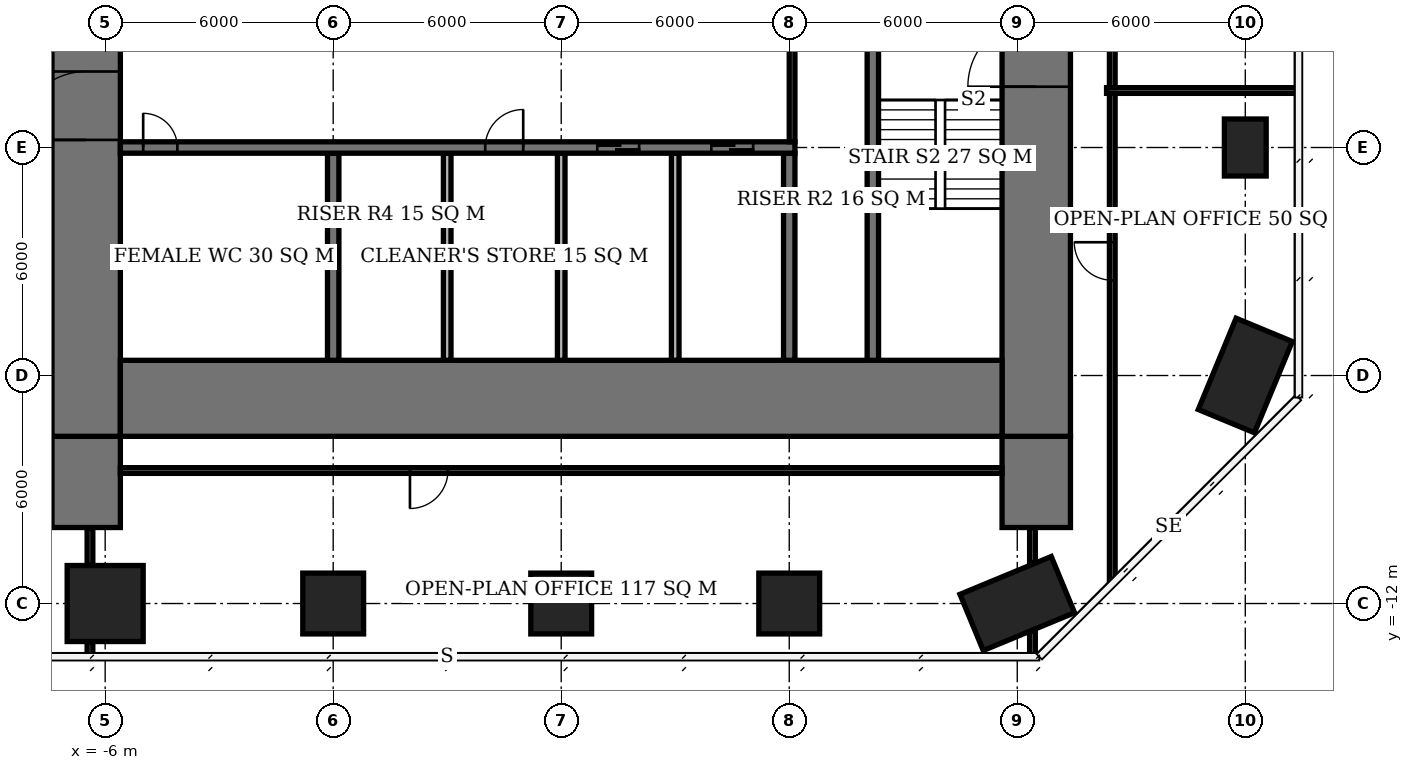
"""IFC4 building model, lengths in metres.
Left out: names, types, materials, properties, quantities, classifications, styles, units other than length and angle.
Written with IfcOpenShell. Run it as: python <this file> out.ifc"""

import sys

from ifc_helpers import new_model, si_unit, direction, frame, frame_2d, origin, origin_2d, place, context, subcontext, project, spatial, rectangle, extrude, element, fill, save


model = new_model("IFC4")
c1 = context("Model", 3, precision=1e-05, world=origin(), true_north=direction((0.0, 1.0)))
c2 = subcontext(c1, "Body", "Model", "MODEL_VIEW")
j1 = project(units=[si_unit("LENGTHUNIT", "METRE"), si_unit("PLANEANGLEUNIT", "RADIAN")], contexts=[c1])
p1 = place(None, origin())
s1 = spatial("IfcSite", under=j1, at=p1, CompositionType="ELEMENT")
p2 = place(p1, origin())
s2 = spatial("IfcBuilding", under=s1, at=p2, CompositionType="ELEMENT")
p3 = place(p2, frame((0.0, 0.0, 208.4)))
s3 = spatial("IfcBuildingStorey", under=s2, at=p3, CompositionType="ELEMENT", Elevation=208.4)
p4 = place(p3, frame((-6.0, -12.0, 0.0), z_axis=(0.0, 0.0, 1.0), x_axis=(1.0, 0.0, 0.0)))
e1 = element("IfcColumn", 1, at=p4, inside=s3, PredefinedType="COLUMN", context=c2, shape_type="SweptSolid", body=[
    extrude(rectangle(XDim=2.0, YDim=2.0, at=origin_2d()), origin(), (0.0, 0.0, 1.0), 3.9),
])
for number, where, z_axis, x_axis in (
    (2, (0.0, -12.0, 0.0), (0.0, 0.0, 1.0), (1.0, 0.0, 0.0)),
    (3, (6.0, -12.0, 0.0), (0.0, 0.0, 1.0), (1.0, 0.0, 0.0)),
    (4, (12.0, -12.0, 0.0), (0.0, 0.0, 1.0), (1.0, 0.0, 0.0)),
):
    element("IfcColumn", number, at=place(p3, frame(where, z_axis=z_axis, x_axis=x_axis)), inside=s3, PredefinedType="COLUMN", context=c2, shape_type="SweptSolid", body=[
        extrude(rectangle(XDim=1.6, YDim=1.6, at=origin_2d()), origin(), (0.0, 0.0, 1.0), 3.9),
    ])
for number, where, z_axis, x_axis in (
    (5, (18.0, -12.0, 0.0), (0.0, 0.0, 1.0), (-0.924, -0.383, 0.0)),
    (6, (24.0, -6.0, 0.0), (0.0, 0.0, 1.0), (-0.383, -0.924, 0.0)),
):
    element("IfcColumn", number, at=place(p3, frame(where, z_axis=z_axis, x_axis=x_axis)), inside=s3, PredefinedType="COLUMN", context=c2, shape_type="SweptSolid", body=[
        extrude(rectangle(XDim=2.6, YDim=1.6, at=origin_2d()), origin(), (0.0, 0.0, 1.0), 3.9),
    ])
p5 = place(p3, frame((24.0, 0.0, 0.0), z_axis=(0.0, 0.0, 1.0), x_axis=(0.0, 1.0, 0.0)))
e7 = element("IfcColumn", 7, at=p5, inside=s3, PredefinedType="COLUMN", context=c2, shape_type="SweptSolid", body=[
    extrude(rectangle(XDim=1.5, YDim=1.1, at=origin_2d()), origin(), (0.0, 0.0, 1.0), 3.9),
])
p6 = place(p3, frame((-5.6, -6.6, 0.0), z_axis=(0.0, 0.0, 1.0), x_axis=(1.0, 0.0, 0.0)))
e8 = element("IfcWall", 8, at=p6, inside=s3, PredefinedType="SHEAR", context=c2, shape_type="SweptSolid", body=[
    extrude(rectangle(XDim=23.2, YDim=2.0, at=frame_2d((11.6, 0.0))), origin(), (0.0, 0.0, 1.0), 3.9),
])
p7 = place(p3, frame((-6.5, -7.6, 0.0), z_axis=(0.0, 0.0, 1.0), x_axis=(0.0, 1.0, 0.0)))
e9 = element("IfcWall", 9, at=p7, inside=s3, PredefinedType="SHEAR", context=c2, shape_type="SweptSolid", body=[
    extrude(rectangle(XDim=21.2, YDim=1.8, at=frame_2d((10.6, 0.0))), origin(), (0.0, 0.0, 1.0), 3.9),
])
p8 = place(p7, frame((7.8, 0.0, 0.0)))
e10 = element("IfcOpeningElement", 10, at=p8, cuts=e9, PredefinedType="OPENING", context=c2, shape_type="SweptSolid", body=[
    extrude(rectangle(XDim=1.8, YDim=2.4, at=frame_2d((0.9, 1.2))), frame((0.0, 0.91, 0.0), z_axis=(0.0, -1.0, 0.0), x_axis=(1.0, 0.0, 0.0)), (0.0, 0.0, 1.0), 1.82),
])
p9 = place(p3, frame((18.5, -7.6, 0.0), z_axis=(0.0, 0.0, 1.0), x_axis=(0.0, 1.0, 0.0)))
e11 = element("IfcWall", 11, at=p9, inside=s3, PredefinedType="SHEAR", context=c2, shape_type="SweptSolid", body=[
    extrude(rectangle(XDim=21.2, YDim=1.8, at=frame_2d((10.6, 0.0))), origin(), (0.0, 0.0, 1.0), 3.9),
])
p10 = place(p9, frame((9.2, 0.0, 0.0)))
e12 = element("IfcOpeningElement", 12, at=p10, cuts=e11, PredefinedType="OPENING", context=c2, shape_type="SweptSolid", body=[
    extrude(rectangle(XDim=1.8, YDim=2.4, at=frame_2d((0.9, 1.2))), frame((0.0, 0.91, 0.0), z_axis=(0.0, -1.0, 0.0), x_axis=(1.0, 0.0, 0.0)), (0.0, 0.0, 1.0), 1.82),
])
for number, where, z_axis, x_axis in (
    (13, (-6.5, -10.0, 0.0), (0.0, 0.0, 1.0), (0.0, 1.0, 0.0)),
    (14, (18.5, -10.0, 0.0), (0.0, 0.0, 1.0), (0.0, 1.0, 0.0)),
):
    element("IfcWall", number, at=place(p3, frame(where, z_axis=z_axis, x_axis=x_axis)), inside=s3, PredefinedType="SHEAR", context=c2, shape_type="SweptSolid", body=[
        extrude(rectangle(XDim=2.4, YDim=1.8, at=frame_2d((1.2, 0.0))), origin(), (0.0, 0.0, 1.0), 3.9),
    ])
p11 = place(p3, frame((-5.6, 0.0, 0.0), z_axis=(0.0, 0.0, 1.0), x_axis=(1.0, 0.0, 0.0)))
e15 = element("IfcWall", 15, at=p11, inside=s3, PredefinedType="SHEAR", context=c2, shape_type="SweptSolid", body=[
    extrude(rectangle(XDim=17.75, YDim=0.3, at=frame_2d((8.875, 0.0))), origin(), (0.0, 0.0, 1.0), 3.9),
])
p12 = place(p11, frame((0.6, 0.0, 0.0)))
e16 = element("IfcOpeningElement", 16, at=p12, cuts=e15, PredefinedType="OPENING", context=c2, shape_type="SweptSolid", body=[
    extrude(rectangle(XDim=0.9, YDim=2.1, at=frame_2d((0.45, 1.05))), frame((0.0, 0.16, 0.0), z_axis=(0.0, -1.0, 0.0), x_axis=(1.0, 0.0, 0.0)), (0.0, 0.0, 1.0), 0.32),
])
p13 = place(p11, frame((9.6, 0.0, 0.0)))
e17 = element("IfcOpeningElement", 17, at=p13, cuts=e15, PredefinedType="OPENING", context=c2, shape_type="SweptSolid", body=[
    extrude(rectangle(XDim=1.0, YDim=2.1, at=frame_2d((0.5, 1.05))), frame((0.0, 0.16, 0.0), z_axis=(0.0, -1.0, 0.0), x_axis=(1.0, 0.0, 0.0)), (0.0, 0.0, 1.0), 0.32),
])
p14 = place(p11, frame((12.55, 0.0, 0.0)))
e18 = element("IfcOpeningElement", 18, at=p14, cuts=e15, PredefinedType="OPENING", context=c2, shape_type="SweptSolid", body=[
    extrude(rectangle(XDim=1.1, YDim=2.1, at=frame_2d((0.55, 1.05))), frame((0.0, 0.16, 0.0), z_axis=(0.0, -1.0, 0.0), x_axis=(1.0, 0.0, 0.0)), (0.0, 0.0, 1.0), 0.32),
])
p15 = place(p11, frame((15.55, 0.0, 0.0)))
e19 = element("IfcOpeningElement", 19, at=p15, cuts=e15, PredefinedType="OPENING", context=c2, shape_type="SweptSolid", body=[
    extrude(rectangle(XDim=1.1, YDim=2.1, at=frame_2d((0.55, 1.05))), frame((0.0, 0.16, 0.0), z_axis=(0.0, -1.0, 0.0), x_axis=(1.0, 0.0, 0.0)), (0.0, 0.0, 1.0), 0.32),
])
for number, where, z_axis, x_axis in (
    (20, (0.0, -5.6, 0.0), (0.0, 0.0, 1.0), (0.0, 1.0, 0.0)),
    (21, (12.0, -5.6, 0.0), (0.0, 0.0, 1.0), (0.0, 1.0, 0.0)),
):
    element("IfcWall", number, at=place(p3, frame(where, z_axis=z_axis, x_axis=x_axis)), inside=s3, PredefinedType="SHEAR", context=c2, shape_type="SweptSolid", body=[
        extrude(rectangle(XDim=5.45, YDim=0.3, at=frame_2d((2.725, 0.0))), origin(), (0.0, 0.0, 1.0), 3.9),
    ])
p16 = place(p3, frame((14.2, -5.6, 0.0), z_axis=(0.0, 0.0, 1.0), x_axis=(0.0, 1.0, 0.0)))
e22 = element("IfcWall", 22, at=p16, inside=s3, PredefinedType="SHEAR", context=c2, shape_type="SweptSolid", body=[
    extrude(rectangle(XDim=8.45, YDim=0.3, at=frame_2d((4.225, 0.0))), origin(), (0.0, 0.0, 1.0), 3.9),
])
for number, where, z_axis, x_axis in (
    (23, (3.0, -5.6, 0.0), (0.0, 0.0, 1.0), (0.0, 1.0, 0.0)),
    (24, (6.0, -5.6, 0.0), (0.0, 0.0, 1.0), (0.0, 1.0, 0.0)),
    (25, (9.0, -5.6, 0.0), (0.0, 0.0, 1.0), (0.0, 1.0, 0.0)),
):
    element("IfcWall", number, at=place(p3, frame(where, z_axis=z_axis, x_axis=x_axis)), inside=s3, PredefinedType="SOLIDWALL", context=c2, shape_type="SweptSolid", body=[
        extrude(rectangle(XDim=5.45, YDim=0.2, at=frame_2d((2.725, 0.0))), origin(), (0.0, 0.0, 1.0), 3.9),
    ])
p17 = place(p3, frame((-6.4, -13.35, 0.0), z_axis=(0.0, 0.0, 1.0), x_axis=(0.0, 1.0, 0.0)))
e26 = element("IfcWall", 26, at=p17, inside=s3, PredefinedType="PARTITIONING", context=c2, shape_type="SweptSolid", body=[
    extrude(rectangle(XDim=0.35, YDim=0.15, at=frame_2d((0.175, 0.0))), origin(), (0.0, 0.0, 1.0), 2.65),
])
p18 = place(p3, frame((-6.4, -11.0, 0.0), z_axis=(0.0, 0.0, 1.0), x_axis=(0.0, 1.0, 0.0)))
e27 = element("IfcWall", 27, at=p18, inside=s3, PredefinedType="PARTITIONING", context=c2, shape_type="SweptSolid", body=[
    extrude(rectangle(XDim=1.0, YDim=0.15, at=frame_2d((0.5, 0.0))), origin(), (0.0, 0.0, 1.0), 3.65),
])
p19 = place(p3, frame((17.6, -8.5, 0.0), z_axis=(0.0, 0.0, 1.0), x_axis=(-1.0, 0.0, 0.0)))
e28 = element("IfcWall", 28, at=p19, inside=s3, PredefinedType="PARTITIONING", context=c2, shape_type="SweptSolid", body=[
    extrude(rectangle(XDim=23.2, YDim=0.15, at=frame_2d((11.6, 0.0))), origin(), (0.0, 0.0, 1.0), 3.65),
])
p20 = place(p19, frame((14.58, 0.0, 0.0)))
e29 = element("IfcOpeningElement", 29, at=p20, cuts=e28, PredefinedType="OPENING", context=c2, shape_type="SweptSolid", body=[
    extrude(rectangle(XDim=1.0, YDim=2.1, at=frame_2d((0.5, 1.05))), frame((0.0, 0.085, 0.0), z_axis=(0.0, -1.0, 0.0), x_axis=(1.0, 0.0, 0.0)), (0.0, 0.0, 1.0), 0.17),
])
p21 = place(p3, frame((18.4, -13.4, 0.0), z_axis=(0.0, 0.0, 1.0), x_axis=(0.0, 1.0, 0.0)))
e30 = element("IfcWall", 30, at=p21, inside=s3, PredefinedType="PARTITIONING", context=c2, shape_type="SweptSolid", body=[
    extrude(rectangle(XDim=0.669, YDim=0.15, at=frame_2d((0.334, 0.0))), origin(), (0.0, 0.0, 1.0), 2.65),
])
p22 = place(p3, frame((18.4, -10.937, 0.0), z_axis=(0.0, 0.0, 1.0), x_axis=(0.0, 1.0, 0.0)))
e31 = element("IfcWall", 31, at=p22, inside=s3, PredefinedType="PARTITIONING", context=c2, shape_type="SweptSolid", body=[
    extrude(rectangle(XDim=0.937, YDim=0.15, at=frame_2d((0.469, 0.0))), origin(), (0.0, 0.0, 1.0), 3.65),
])
p23 = place(p3, frame((20.5, -11.39, 0.0), z_axis=(0.0, 0.0, 1.0), x_axis=(0.0, 1.0, 0.0)))
e32 = element("IfcWall", 32, at=p23, inside=s3, PredefinedType="PARTITIONING", context=c2, shape_type="SweptSolid", body=[
    extrude(rectangle(XDim=12.815, YDim=0.15, at=frame_2d((6.407, 0.0))), origin(), (0.0, 0.0, 1.0), 3.65),
])
p24 = place(p23, frame((7.897, 0.0, 0.0)))
e33 = element("IfcOpeningElement", 33, at=p24, cuts=e32, PredefinedType="OPENING", context=c2, shape_type="SweptSolid", body=[
    extrude(rectangle(XDim=1.0, YDim=2.1, at=frame_2d((0.5, 1.05))), frame((0.0, 0.085, 0.0), z_axis=(0.0, -1.0, 0.0), x_axis=(1.0, 0.0, 0.0)), (0.0, 0.0, 1.0), 0.17),
])
p25 = place(p3, frame((20.5, 1.575, 0.0), z_axis=(0.0, 0.0, 1.0), x_axis=(0.0, 1.0, 0.0)))
e34 = element("IfcWall", 34, at=p25, inside=s3, PredefinedType="PARTITIONING", context=c2, shape_type="SweptSolid", body=[
    extrude(rectangle(XDim=21.715, YDim=0.15, at=frame_2d((10.857, 0.0))), origin(), (0.0, 0.0, 1.0), 3.65),
])
p26 = place(p25, frame((17.52, 0.0, 0.0)))
e35 = element("IfcOpeningElement", 35, at=p26, cuts=e34, PredefinedType="OPENING", context=c2, shape_type="SweptSolid", body=[
    extrude(rectangle(XDim=1.0, YDim=2.1, at=frame_2d((0.5, 1.05))), frame((0.0, 0.085, 0.0), z_axis=(0.0, -1.0, 0.0), x_axis=(1.0, 0.0, 0.0)), (0.0, 0.0, 1.0), 0.17),
])
p27 = place(p3, frame((20.35, 1.5, 0.0), z_axis=(0.0, 0.0, 1.0), x_axis=(1.0, 0.0, 0.0)))
e36 = element("IfcWall", 36, at=p27, inside=s3, PredefinedType="PARTITIONING", context=c2, shape_type="SweptSolid", body=[
    extrude(rectangle(XDim=5.05, YDim=0.15, at=frame_2d((2.525, 0.0))), origin(), (0.0, 0.0, 1.0), 3.65),
])
p28 = place(p3, frame((12.075, 0.15, 0.0), z_axis=(0.0, 0.0, 1.0), x_axis=(0.0, 1.0, 0.0)))
e37 = element("IfcWall", 37, at=p28, inside=s3, PredefinedType="PARTITIONING", context=c2, shape_type="SweptSolid", body=[
    extrude(rectangle(XDim=3.0, YDim=0.15, at=frame_2d((1.5, 0.0))), origin(), (0.0, 0.0, 1.0), 3.65),
])
p29 = place(p8, origin())
e38 = element("IfcDoor", 38, at=p29, inside=s3, OperationType="DOUBLE_DOOR_SINGLE_SWING", PredefinedType="DOOR", context=c2, shape_type="SweptSolid", body=[
    extrude(rectangle(XDim=1.8, YDim=2.4, at=frame_2d((0.9, 1.2))), frame((0.0, 0.025, 0.0), z_axis=(0.0, -1.0, 0.0), x_axis=(1.0, 0.0, 0.0)), (0.0, 0.0, 1.0), 0.05),
])
fill(e10, e38)
p30 = place(p10, origin())
e39 = element("IfcDoor", 39, at=p30, inside=s3, OperationType="DOUBLE_DOOR_SINGLE_SWING", PredefinedType="DOOR", context=c2, shape_type="SweptSolid", body=[
    extrude(rectangle(XDim=1.8, YDim=2.4, at=frame_2d((0.9, 1.2))), frame((0.0, 0.025, 0.0), z_axis=(0.0, -1.0, 0.0), x_axis=(1.0, 0.0, 0.0)), (0.0, 0.0, 1.0), 0.05),
])
fill(e12, e39)
p31 = place(p12, origin())
e40 = element("IfcDoor", 40, at=p31, inside=s3, OperationType="SINGLE_SWING_LEFT", PredefinedType="DOOR", context=c2, shape_type="SweptSolid", body=[
    extrude(rectangle(XDim=0.9, YDim=2.1, at=frame_2d((0.45, 1.05))), frame((0.0, 0.025, 0.0), z_axis=(0.0, -1.0, 0.0), x_axis=(1.0, 0.0, 0.0)), (0.0, 0.0, 1.0), 0.05),
])
fill(e16, e40)
p32 = place(p13, origin())
e41 = element("IfcDoor", 41, at=p32, inside=s3, OperationType="SINGLE_SWING_RIGHT", PredefinedType="DOOR", context=c2, shape_type="SweptSolid", body=[
    extrude(rectangle(XDim=1.0, YDim=2.1, at=frame_2d((0.5, 1.05))), frame((0.0, 0.025, 0.0), z_axis=(0.0, -1.0, 0.0), x_axis=(1.0, 0.0, 0.0)), (0.0, 0.0, 1.0), 0.05),
])
fill(e17, e41)
p33 = place(p14, origin())
e42 = element("IfcDoor", 42, at=p33, inside=s3, OperationType="DOUBLE_DOOR_SLIDING", PredefinedType="USERDEFINED", context=c2, shape_type="SweptSolid", body=[
    extrude(rectangle(XDim=1.1, YDim=2.1, at=frame_2d((0.55, 1.05))), frame((0.0, 0.025, 0.0), z_axis=(0.0, -1.0, 0.0), x_axis=(1.0, 0.0, 0.0)), (0.0, 0.0, 1.0), 0.05),
])
fill(e18, e42)
p34 = place(p15, origin())
e43 = element("IfcDoor", 43, at=p34, inside=s3, OperationType="DOUBLE_DOOR_SLIDING", PredefinedType="USERDEFINED", context=c2, shape_type="SweptSolid", body=[
    extrude(rectangle(XDim=1.1, YDim=2.1, at=frame_2d((0.55, 1.05))), frame((0.0, 0.025, 0.0), z_axis=(0.0, -1.0, 0.0), x_axis=(1.0, 0.0, 0.0)), (0.0, 0.0, 1.0), 0.05),
])
fill(e19, e43)
p35 = place(p24, origin())
e44 = element("IfcDoor", 44, at=p35, inside=s3, OperationType="SINGLE_SWING_RIGHT", PredefinedType="DOOR", context=c2, shape_type="SweptSolid", body=[
    extrude(rectangle(XDim=1.0, YDim=2.1, at=frame_2d((0.5, 1.05))), frame((0.0, 0.025, 0.0), z_axis=(0.0, -1.0, 0.0), x_axis=(1.0, 0.0, 0.0)), (0.0, 0.0, 1.0), 0.05),
])
fill(e33, e44)
p36 = place(p20, origin())
e45 = element("IfcDoor", 45, at=p36, inside=s3, OperationType="SINGLE_SWING_RIGHT", PredefinedType="DOOR", context=c2, shape_type="SweptSolid", body=[
    extrude(rectangle(XDim=1.0, YDim=2.1, at=frame_2d((0.5, 1.05))), frame((0.0, 0.025, 0.0), z_axis=(0.0, -1.0, 0.0), x_axis=(1.0, 0.0, 0.0)), (0.0, 0.0, 1.0), 0.05),
])
fill(e29, e45)
save(model, sys.argv[1])
